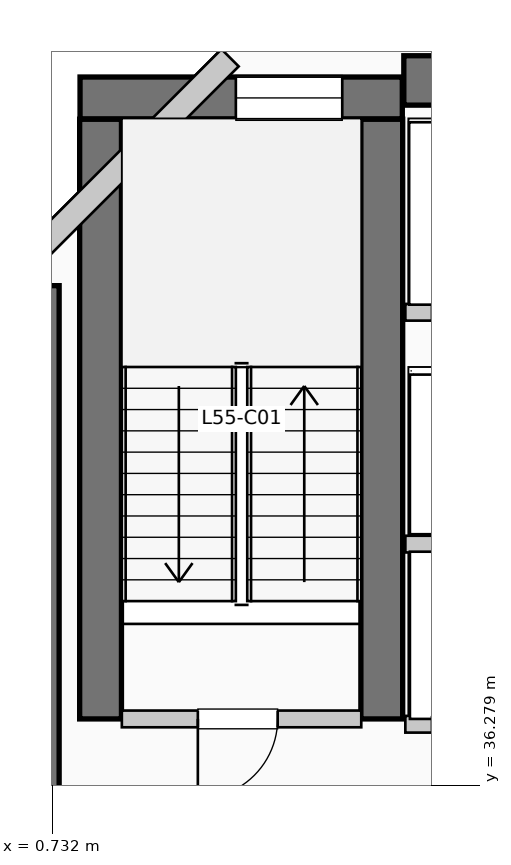
"""IFC4 building model, lengths in metres.
Left out: names, types, materials, properties, quantities, classifications, styles, units other than length and angle.
Written with IfcOpenShell. Run it as: python <this file> out.ifc"""

import sys

from ifc_helpers import new_model, si_unit, direction, frame, frame_2d, origin, place, context, subcontext, project, spatial, rectangle, extrude, element, fill, save


model = new_model("IFC4")
c1 = context("Model", 3, precision=1e-05, world=origin(), true_north=direction((0.0, 1.0)))
c2 = subcontext(c1, "Body", "Model", "MODEL_VIEW")
j1 = project(units=[si_unit("LENGTHUNIT", "METRE"), si_unit("PLANEANGLEUNIT", "RADIAN")], contexts=[c1])
p1 = place(None, origin())
s1 = spatial("IfcSite", under=j1, at=p1, CompositionType="ELEMENT")
p2 = place(p1, origin())
s2 = spatial("IfcBuilding", under=s1, at=p2, CompositionType="ELEMENT")
p3 = place(p2, frame((0.0, 0.0, 227.7)))
s3 = spatial("IfcBuildingStorey", under=s2, at=p3, CompositionType="ELEMENT", Elevation=227.7)
p4 = place(p3, frame((5.36, 45.55, 0.0), z_axis=(0.0, 0.0, 1.0), x_axis=(1.0, 0.0, 0.0)))
e1 = element("IfcWall", 1, at=p4, inside=s3, PredefinedType="SHEAR", context=c2, shape_type="SweptSolid", body=[
    extrude(rectangle(XDim=13.98, YDim=0.65, at=frame_2d((6.99, 0.0))), origin(), (0.0, 0.0, 1.0), 3.96),
])
p5 = place(p3, frame((0.5, 34.95, 0.0), z_axis=(0.0, 0.0, 1.0), x_axis=(0.0, 1.0, 0.0)))
e2 = element("IfcWall", 2, at=p5, inside=s3, PredefinedType="SHEAR", context=c2, shape_type="SweptSolid", body=[
    extrude(rectangle(XDim=7.9, YDim=0.65, at=frame_2d((3.95, 0.0))), origin(), (0.0, 0.0, 1.0), 3.96),
])
for number, where, z_axis, x_axis in (
    (3, (1.37, 37.15, 0.0), (0.0, 0.0, 1.0), (0.0, 1.0, 0.0)),
    (4, (5.07, 37.15, 0.0), (0.0, 0.0, 1.0), (0.0, 1.0, 0.0)),
):
    element("IfcWall", number, at=place(p3, frame(where, z_axis=z_axis, x_axis=x_axis)), inside=s3, PredefinedType="SHEAR", context=c2, shape_type="SweptSolid", body=[
        extrude(rectangle(XDim=7.89, YDim=0.55, at=frame_2d((3.945, 0.0))), origin(), (0.0, 0.0, 1.0), 3.96),
    ])
p6 = place(p3, frame((1.1, 45.32, 0.0), z_axis=(0.0, 0.0, 1.0), x_axis=(1.0, 0.0, 0.0)))
e5 = element("IfcWall", 5, at=p6, inside=s3, PredefinedType="SHEAR", context=c2, shape_type="SweptSolid", body=[
    extrude(rectangle(XDim=4.24, YDim=0.55, at=frame_2d((2.12, 0.0))), origin(), (0.0, 0.0, 1.0), 3.96),
])
p7 = place(p6, frame((2.05, 0.0, 1.05)))
e6 = element("IfcOpeningElement", 6, at=p7, cuts=e5, PredefinedType="OPENING", context=c2, shape_type="SweptSolid", body=[
    extrude(rectangle(XDim=1.4, YDim=1.8, at=frame_2d((0.7, 0.9))), frame((0.0, 0.285, 0.0), z_axis=(0.0, -1.0, 0.0), x_axis=(1.0, 0.0, 0.0)), (0.0, 0.0, 1.0), 0.57),
])
p8 = place(p3, frame((3.074, 45.848, 0.0), z_axis=(0.0, 0.0, 1.0), x_axis=(-0.707106781187, -0.707106781187, 0.0)))
e7 = element("IfcWall", 7, at=p8, inside=s3, PredefinedType="SOLIDWALL", context=c2, shape_type="SweptSolid", body=[
    extrude(rectangle(XDim=4.133, YDim=0.32, at=frame_2d((2.066, 0.0))), origin(), (0.0, 0.0, 1.0), 3.71),
])
p9 = place(p3, frame((1.65, 37.15, 0.0), z_axis=(0.0, 0.0, 1.0), x_axis=(1.0, 0.0, 0.0)))
e8 = element("IfcWall", 8, at=p9, inside=s3, PredefinedType="PARTITIONING", context=c2, shape_type="SweptSolid", body=[
    extrude(rectangle(XDim=3.15, YDim=0.22, at=frame_2d((1.575, 0.0))), origin(), (0.0, 0.0, 1.0), 3.71),
])
p10 = place(p9, frame((2.05, 0.0, 0.0), z_axis=(0.0, 0.0, 1.0), x_axis=(-1.0, 0.0, 0.0)))
e9 = element("IfcOpeningElement", 9, at=p10, cuts=e8, PredefinedType="OPENING", context=c2, shape_type="SweptSolid", body=[
    extrude(rectangle(XDim=1.05, YDim=2.15, at=frame_2d((0.525, 1.075))), frame((0.0, 0.12, 0.0), z_axis=(0.0, -1.0, 0.0), x_axis=(1.0, 0.0, 0.0)), (0.0, 0.0, 1.0), 0.24),
])
p11 = place(p3, frame((5.38, 37.08, 0.0), z_axis=(0.0, 0.0, 1.0), x_axis=(1.0, 0.0, 0.0)))
e10 = element("IfcWall", 10, at=p11, inside=s3, PredefinedType="PARTITIONING", context=c2, shape_type="SweptSolid", body=[
    extrude(rectangle(XDim=3.46, YDim=0.22, at=frame_2d((1.73, 0.0))), origin(), (0.0, 0.0, 1.0), 3.71),
])
p12 = place(p11, frame((1.55, 0.0, 0.0), z_axis=(0.0, 0.0, 1.0), x_axis=(-1.0, 0.0, 0.0)))
e11 = element("IfcOpeningElement", 11, at=p12, cuts=e10, PredefinedType="OPENING", context=c2, shape_type="SweptSolid", body=[
    extrude(rectangle(XDim=1.2, YDim=2.2, at=frame_2d((0.6, 1.1))), frame((0.0, 0.12, 0.0), z_axis=(0.0, -1.0, 0.0), x_axis=(1.0, 0.0, 0.0)), (0.0, 0.0, 1.0), 0.24),
])
p13 = place(p11, frame((3.22, 0.0, 0.0), z_axis=(0.0, 0.0, 1.0), x_axis=(-1.0, 0.0, 0.0)))
e12 = element("IfcOpeningElement", 12, at=p13, cuts=e10, PredefinedType="OPENING", context=c2, shape_type="SweptSolid", body=[
    extrude(rectangle(XDim=1.2, YDim=2.2, at=frame_2d((0.6, 1.1))), frame((0.0, 0.12, 0.0), z_axis=(0.0, -1.0, 0.0), x_axis=(1.0, 0.0, 0.0)), (0.0, 0.0, 1.0), 0.24),
])
p14 = place(p3, frame((5.38, 39.45, 0.0), z_axis=(0.0, 0.0, 1.0), x_axis=(1.0, 0.0, 0.0)))
e13 = element("IfcWall", 13, at=p14, inside=s3, PredefinedType="PARTITIONING", context=c2, shape_type="SweptSolid", body=[
    extrude(rectangle(XDim=3.46, YDim=0.22, at=frame_2d((1.73, 0.0))), origin(), (0.0, 0.0, 1.0), 3.71),
])
p15 = place(p3, frame((5.38, 42.5, 0.0), z_axis=(0.0, 0.0, 1.0), x_axis=(1.0, 0.0, 0.0)))
e14 = element("IfcWall", 14, at=p15, inside=s3, PredefinedType="PARTITIONING", context=c2, shape_type="SweptSolid", body=[
    extrude(rectangle(XDim=3.77, YDim=0.22, at=frame_2d((1.885, 0.0))), origin(), (0.0, 0.0, 1.0), 3.71),
])
p16 = place(p15, frame((1.75, 0.0, 0.0), z_axis=(0.0, 0.0, 1.0), x_axis=(-1.0, 0.0, 0.0)))
e15 = element("IfcOpeningElement", 15, at=p16, cuts=e14, PredefinedType="OPENING", context=c2, shape_type="SweptSolid", body=[
    extrude(rectangle(XDim=1.4, YDim=2.2, at=frame_2d((0.7, 1.1))), frame((0.0, 0.12, 0.0), z_axis=(0.0, -1.0, 0.0), x_axis=(1.0, 0.0, 0.0)), (0.0, 0.0, 1.0), 0.24),
])
p17 = place(p15, frame((3.53, 0.0, 0.0), z_axis=(0.0, 0.0, 1.0), x_axis=(-1.0, 0.0, 0.0)))
e16 = element("IfcOpeningElement", 16, at=p17, cuts=e14, PredefinedType="OPENING", context=c2, shape_type="SweptSolid", body=[
    extrude(rectangle(XDim=1.4, YDim=2.2, at=frame_2d((0.7, 1.1))), frame((0.0, 0.12, 0.0), z_axis=(0.0, -1.0, 0.0), x_axis=(1.0, 0.0, 0.0)), (0.0, 0.0, 1.0), 0.24),
])
p18 = place(p7, origin())
e17 = element("IfcWindow", 17, at=p18, inside=s3, PartitioningType="SINGLE_PANEL", PredefinedType="WINDOW", context=c2, shape_type="SweptSolid", body=[
    extrude(rectangle(XDim=1.4, YDim=1.8, at=frame_2d((0.7, 0.9))), frame((0.0, 0.03, 0.0), z_axis=(0.0, -1.0, 0.0), x_axis=(1.0, 0.0, 0.0)), (0.0, 0.0, 1.0), 0.06),
])
fill(e6, e17)
p19 = place(p10, origin())
e18 = element("IfcDoor", 18, at=p19, inside=s3, OperationType="SINGLE_SWING_LEFT", PredefinedType="DOOR", context=c2, shape_type="SweptSolid", body=[
    extrude(rectangle(XDim=1.05, YDim=2.15, at=frame_2d((0.525, 1.075))), frame((0.0, 0.025, 0.0), z_axis=(0.0, -1.0, 0.0), x_axis=(1.0, 0.0, 0.0)), (0.0, 0.0, 1.0), 0.05),
])
fill(e9, e18)
save(model, sys.argv[1])
